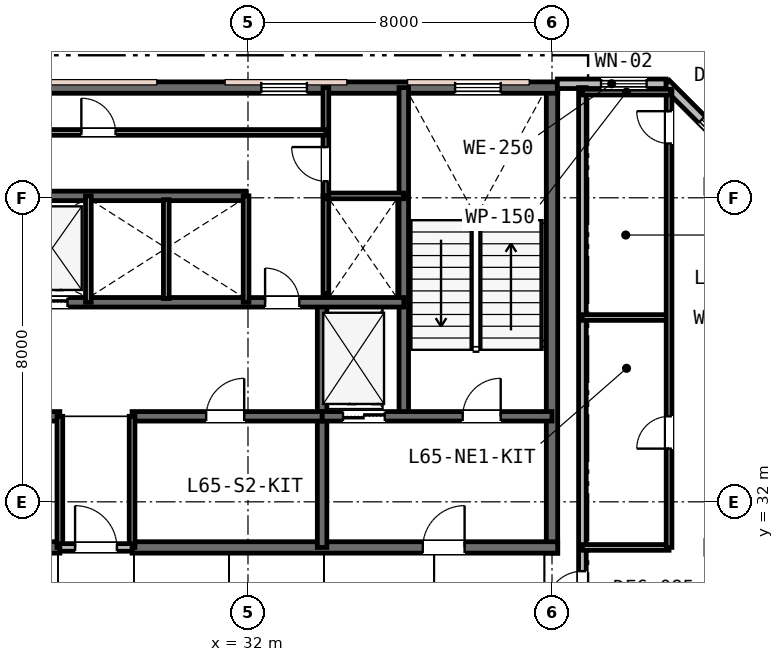
"""IFC4 building model, lengths in metres.
Left out: names, types, materials, properties, quantities, classifications, styles, units other than length and angle.
Written with IfcOpenShell. Run it as: python <this file> out.ifc"""

import sys

from ifc_helpers import new_model, si_unit, direction, frame, frame_2d, origin, place, context, subcontext, project, spatial, rectangle, extrude, element, fill, save


model = new_model("IFC4")
c1 = context("Model", 3, precision=1e-05, world=origin(), true_north=direction((0.0, 1.0)))
c2 = subcontext(c1, "Body", "Model", "MODEL_VIEW")
j1 = project(units=[si_unit("LENGTHUNIT", "METRE"), si_unit("PLANEANGLEUNIT", "RADIAN")], contexts=[c1])
p1 = place(None, origin())
s1 = spatial("IfcSite", under=j1, at=p1, CompositionType="ELEMENT")
p2 = place(p1, origin())
s2 = spatial("IfcBuilding", under=s1, at=p2, CompositionType="ELEMENT")
p3 = place(p2, frame((0.0, 0.0, 252.6)))
s3 = spatial("IfcBuildingStorey", under=s2, at=p3, CompositionType="ELEMENT", Elevation=252.6)
p4 = place(p3, frame((40.0, 30.65, 0.0), z_axis=(0.0, 0.0, 1.0), x_axis=(0.0, 1.0, 0.0)))
e1 = element("IfcWall", 1, at=p4, inside=s3, PredefinedType="SHEAR", context=c2, shape_type="SweptSolid", body=[
    extrude(rectangle(XDim=12.3, YDim=0.3, at=frame_2d((6.15, 0.0))), origin(), (0.0, 0.0, 1.0), 3.8),
])
p5 = place(p3, frame((15.85, 42.9, 0.0), z_axis=(0.0, 0.0, 1.0), x_axis=(1.0, 0.0, 0.0)))
e2 = element("IfcWall", 2, at=p5, inside=s3, PredefinedType="SHEAR", context=c2, shape_type="SweptSolid", body=[
    extrude(rectangle(XDim=24.3, YDim=0.3, at=frame_2d((12.15, 0.0))), origin(), (0.0, 0.0, 1.0), 3.8),
])
p6 = place(p5, frame((1.6, 0.0, 0.95)))
e3 = element("IfcOpeningElement", 3, at=p6, cuts=e2, PredefinedType="OPENING", context=c2, shape_type="SweptSolid", body=[
    extrude(rectangle(XDim=1.2, YDim=1.6, at=frame_2d((0.6, 0.8))), frame((0.0, 0.16, 0.0), z_axis=(0.0, -1.0, 0.0), x_axis=(1.0, 0.0, 0.0)), (0.0, 0.0, 1.0), 0.32),
])
p7 = place(p5, frame((16.5, 0.0, 0.95)))
e4 = element("IfcOpeningElement", 4, at=p7, cuts=e2, PredefinedType="OPENING", context=c2, shape_type="SweptSolid", body=[
    extrude(rectangle(XDim=1.2, YDim=1.6, at=frame_2d((0.6, 0.8))), frame((0.0, 0.16, 0.0), z_axis=(0.0, -1.0, 0.0), x_axis=(1.0, 0.0, 0.0)), (0.0, 0.0, 1.0), 0.32),
])
p8 = place(p5, frame((21.6, 0.0, 0.95)))
e5 = element("IfcOpeningElement", 5, at=p8, cuts=e2, PredefinedType="OPENING", context=c2, shape_type="SweptSolid", body=[
    extrude(rectangle(XDim=1.2, YDim=1.6, at=frame_2d((0.6, 0.8))), frame((0.0, 0.16, 0.0), z_axis=(0.0, -1.0, 0.0), x_axis=(1.0, 0.0, 0.0)), (0.0, 0.0, 1.0), 0.32),
])
p9 = place(p3, frame((15.85, 30.8, 0.0), z_axis=(0.0, 0.0, 1.0), x_axis=(1.0, 0.0, 0.0)))
e6 = element("IfcWall", 6, at=p9, inside=s3, PredefinedType="SHEAR", context=c2, shape_type="SweptSolid", body=[
    extrude(rectangle(XDim=11.2, YDim=0.3, at=frame_2d((5.6, 0.0))), origin(), (0.0, 0.0, 1.0), 3.8),
])
p10 = place(p9, frame((2.45, 0.0, 0.0)))
e7 = element("IfcOpeningElement", 7, at=p10, cuts=e6, PredefinedType="OPENING", context=c2, shape_type="SweptSolid", body=[
    extrude(rectangle(XDim=1.1, YDim=2.15, at=frame_2d((0.55, 1.075))), frame((0.0, 0.16, 0.0), z_axis=(0.0, -1.0, 0.0), x_axis=(1.0, 0.0, 0.0)), (0.0, 0.0, 1.0), 0.32),
])
p11 = place(p3, frame((28.95, 30.8, 0.0), z_axis=(0.0, 0.0, 1.0), x_axis=(1.0, 0.0, 0.0)))
e8 = element("IfcWall", 8, at=p11, inside=s3, PredefinedType="SHEAR", context=c2, shape_type="SweptSolid", body=[
    extrude(rectangle(XDim=11.2, YDim=0.3, at=frame_2d((5.6, 0.0))), origin(), (0.0, 0.0, 1.0), 3.8),
])
p12 = place(p11, frame((7.65, 0.0, 0.0)))
e9 = element("IfcOpeningElement", 9, at=p12, cuts=e8, PredefinedType="OPENING", context=c2, shape_type="SweptSolid", body=[
    extrude(rectangle(XDim=1.1, YDim=2.15, at=frame_2d((0.55, 1.075))), frame((0.0, 0.16, 0.0), z_axis=(0.0, -1.0, 0.0), x_axis=(1.0, 0.0, 0.0)), (0.0, 0.0, 1.0), 0.32),
])
p13 = place(p3, frame((36.1, 34.25, 0.0), z_axis=(0.0, 0.0, 1.0), x_axis=(0.0, 1.0, 0.0)))
e10 = element("IfcWall", 10, at=p13, inside=s3, PredefinedType="SHEAR", context=c2, shape_type="SweptSolid", body=[
    extrude(rectangle(XDim=8.65, YDim=0.25, at=frame_2d((4.325, 0.0))), origin(), (0.0, 0.0, 1.0), 3.8),
])
p14 = place(p3, frame((33.95, 30.8, 0.0), z_axis=(0.0, 0.0, 1.0), x_axis=(0.0, 1.0, 0.0)))
e11 = element("IfcWall", 11, at=p14, inside=s3, PredefinedType="SHEAR", context=c2, shape_type="SweptSolid", body=[
    extrude(rectangle(XDim=6.45, YDim=0.25, at=frame_2d((3.225, 0.0))), origin(), (0.0, 0.0, 1.0), 3.8),
])
p15 = place(p3, frame((33.95, 34.25, 0.0), z_axis=(0.0, 0.0, 1.0), x_axis=(1.0, 0.0, 0.0)))
e12 = element("IfcWall", 12, at=p15, inside=s3, PredefinedType="SHEAR", context=c2, shape_type="SweptSolid", body=[
    extrude(rectangle(XDim=6.05, YDim=0.25, at=frame_2d((3.025, 0.0))), origin(), (0.0, 0.0, 1.0), 3.8),
])
p16 = place(p15, frame((3.7, 0.0, 0.0)))
e13 = element("IfcOpeningElement", 13, at=p16, cuts=e12, PredefinedType="OPENING", context=c2, shape_type="SweptSolid", body=[
    extrude(rectangle(XDim=1.0, YDim=2.15, at=frame_2d((0.5, 1.075))), frame((0.0, 0.135, 0.0), z_axis=(0.0, -1.0, 0.0), x_axis=(1.0, 0.0, 0.0)), (0.0, 0.0, 1.0), 0.27),
])
p17 = place(p15, frame((0.55, 0.0, 0.0)))
e14 = element("IfcOpeningElement", 14, at=p17, cuts=e12, PredefinedType="OPENING", context=c2, shape_type="SweptSolid", body=[
    extrude(rectangle(XDim=1.1, YDim=2.15, at=frame_2d((0.55, 1.075))), frame((0.0, 0.135, 0.0), z_axis=(0.0, -1.0, 0.0), x_axis=(1.0, 0.0, 0.0)), (0.0, 0.0, 1.0), 0.27),
])
p18 = place(p3, frame((22.05, 34.25, 0.0), z_axis=(0.0, 0.0, 1.0), x_axis=(1.0, 0.0, 0.0)))
e15 = element("IfcWall", 15, at=p18, inside=s3, PredefinedType="SHEAR", context=c2, shape_type="SweptSolid", body=[
    extrude(rectangle(XDim=5.0, YDim=0.25, at=frame_2d((2.5, 0.0))), origin(), (0.0, 0.0, 1.0), 3.8),
])
p19 = place(p18, frame((1.95, 0.0, 0.0)))
e16 = element("IfcOpeningElement", 16, at=p19, cuts=e15, PredefinedType="OPENING", context=c2, shape_type="SweptSolid", body=[
    extrude(rectangle(XDim=1.0, YDim=2.15, at=frame_2d((0.5, 1.075))), frame((0.0, 0.135, 0.0), z_axis=(0.0, -1.0, 0.0), x_axis=(1.0, 0.0, 0.0)), (0.0, 0.0, 1.0), 0.27),
])
p20 = place(p3, frame((28.95, 34.25, 0.0), z_axis=(0.0, 0.0, 1.0), x_axis=(1.0, 0.0, 0.0)))
e17 = element("IfcWall", 17, at=p20, inside=s3, PredefinedType="SHEAR", context=c2, shape_type="SweptSolid", body=[
    extrude(rectangle(XDim=5.0, YDim=0.25, at=frame_2d((2.5, 0.0))), origin(), (0.0, 0.0, 1.0), 3.8),
])
p21 = place(p20, frame((1.95, 0.0, 0.0)))
e18 = element("IfcOpeningElement", 18, at=p21, cuts=e17, PredefinedType="OPENING", context=c2, shape_type="SweptSolid", body=[
    extrude(rectangle(XDim=1.0, YDim=2.15, at=frame_2d((0.5, 1.075))), frame((0.0, 0.135, 0.0), z_axis=(0.0, -1.0, 0.0), x_axis=(1.0, 0.0, 0.0)), (0.0, 0.0, 1.0), 0.27),
])
p22 = place(p3, frame((19.9, 37.25, 0.0), z_axis=(0.0, 0.0, 1.0), x_axis=(1.0, 0.0, 0.0)))
e19 = element("IfcWall", 19, at=p22, inside=s3, PredefinedType="SHEAR", context=c2, shape_type="SweptSolid", body=[
    extrude(rectangle(XDim=16.2, YDim=0.25, at=frame_2d((8.1, 0.0))), origin(), (0.0, 0.0, 1.0), 3.8),
])
p23 = place(p22, frame((12.55, 0.0, 0.0)))
e20 = element("IfcOpeningElement", 20, at=p23, cuts=e19, PredefinedType="OPENING", context=c2, shape_type="SweptSolid", body=[
    extrude(rectangle(XDim=0.9, YDim=2.15, at=frame_2d((0.45, 1.075))), frame((0.0, 0.135, 0.0), z_axis=(0.0, -1.0, 0.0), x_axis=(1.0, 0.0, 0.0)), (0.0, 0.0, 1.0), 0.27),
])
p24 = place(p22, frame((2.5, 0.0, 0.0)))
e21 = element("IfcOpeningElement", 21, at=p24, cuts=e19, PredefinedType="OPENING", context=c2, shape_type="SweptSolid", body=[
    extrude(rectangle(XDim=1.05, YDim=2.15, at=frame_2d((0.525, 1.075))), frame((0.0, 0.135, 0.0), z_axis=(0.0, -1.0, 0.0), x_axis=(1.0, 0.0, 0.0)), (0.0, 0.0, 1.0), 0.27),
])
p25 = place(p22, frame((4.4, 0.0, 0.0)))
e22 = element("IfcOpeningElement", 22, at=p25, cuts=e19, PredefinedType="OPENING", context=c2, shape_type="SweptSolid", body=[
    extrude(rectangle(XDim=1.05, YDim=2.15, at=frame_2d((0.525, 1.075))), frame((0.0, 0.135, 0.0), z_axis=(0.0, -1.0, 0.0), x_axis=(1.0, 0.0, 0.0)), (0.0, 0.0, 1.0), 0.27),
])
p26 = place(p22, frame((6.3, 0.0, 0.0)))
e23 = element("IfcOpeningElement", 23, at=p26, cuts=e19, PredefinedType="OPENING", context=c2, shape_type="SweptSolid", body=[
    extrude(rectangle(XDim=1.05, YDim=2.15, at=frame_2d((0.525, 1.075))), frame((0.0, 0.135, 0.0), z_axis=(0.0, -1.0, 0.0), x_axis=(1.0, 0.0, 0.0)), (0.0, 0.0, 1.0), 0.27),
])
p27 = place(p3, frame((19.9, 40.05, 0.0), z_axis=(0.0, 0.0, 1.0), x_axis=(1.0, 0.0, 0.0)))
e24 = element("IfcWall", 24, at=p27, inside=s3, PredefinedType="SHEAR", context=c2, shape_type="SweptSolid", body=[
    extrude(rectangle(XDim=12.05, YDim=0.25, at=frame_2d((6.025, 0.0))), origin(), (0.0, 0.0, 1.0), 3.8),
])
p28 = place(p3, frame((46.0, 40.0, 0.0), z_axis=(0.0, 0.0, 1.0), x_axis=(-0.707106781187, 0.707106781187, 0.0)))
e25 = element("IfcWall", 25, at=p28, inside=s3, PredefinedType="STANDARD", context=c2, shape_type="SweptSolid", body=[
    extrude(rectangle(XDim=4.243, YDim=0.25, at=frame_2d((2.121, 0.0))), origin(), (0.0, 0.0, 1.0), 3.53),
])
p29 = place(p28, frame((1.111, 0.0, 0.75)))
e26 = element("IfcOpeningElement", 26, at=p29, cuts=e25, PredefinedType="OPENING", context=c2, shape_type="SweptSolid", body=[
    extrude(rectangle(XDim=1.8, YDim=1.85, at=frame_2d((0.9, 0.925))), frame((0.0, 0.135, 0.0), z_axis=(0.0, -1.0, 0.0), x_axis=(1.0, 0.0, 0.0)), (0.0, 0.0, 1.0), 0.27),
])
p30 = place(p3, frame((43.0, 43.0, 0.0), z_axis=(0.0, 0.0, 1.0), x_axis=(-1.0, 0.0, 0.0)))
e27 = element("IfcWall", 27, at=p30, inside=s3, PredefinedType="STANDARD", context=c2, shape_type="SweptSolid", body=[
    extrude(rectangle(XDim=2.86, YDim=0.25, at=frame_2d((1.43, 0.0))), origin(), (0.0, 0.0, 1.0), 3.53),
])
p31 = place(p30, frame((0.51, 0.0, 0.85)))
e28 = element("IfcOpeningElement", 28, at=p31, cuts=e27, PredefinedType="OPENING", context=c2, shape_type="SweptSolid", body=[
    extrude(rectangle(XDim=1.2, YDim=1.6, at=frame_2d((0.6, 0.8))), frame((0.0, 0.135, 0.0), z_axis=(0.0, -1.0, 0.0), x_axis=(1.0, 0.0, 0.0)), (0.0, 0.0, 1.0), 0.27),
])
for number, where, z_axis, x_axis in (
    (29, (27.05, 30.8, 0.0), (0.0, 0.0, 1.0), (0.0, 1.0, 0.0)),
    (30, (28.95, 30.8, 0.0), (0.0, 0.0, 1.0), (0.0, 1.0, 0.0)),
):
    element("IfcWall", number, at=place(p3, frame(where, z_axis=z_axis, x_axis=x_axis)), inside=s3, PredefinedType="PLUMBINGWALL", context=c2, shape_type="SweptSolid", body=[
        extrude(rectangle(XDim=3.45, YDim=0.15, at=frame_2d((1.725, 0.0))), origin(), (0.0, 0.0, 1.0), 3.28),
    ])
p32 = place(p3, frame((27.05, 30.8, 0.0), z_axis=(0.0, 0.0, 1.0), x_axis=(1.0, 0.0, 0.0)))
e31 = element("IfcWall", 31, at=p32, inside=s3, PredefinedType="PARTITIONING", context=c2, shape_type="SweptSolid", body=[
    extrude(rectangle(XDim=1.9, YDim=0.2, at=frame_2d((0.95, 0.0))), origin(), (0.0, 0.0, 1.0), 3.28),
])
p33 = place(p32, frame((0.4, 0.0, 0.0)))
e32 = element("IfcOpeningElement", 32, at=p33, cuts=e31, PredefinedType="OPENING", context=c2, shape_type="SweptSolid", body=[
    extrude(rectangle(XDim=1.1, YDim=2.15, at=frame_2d((0.55, 1.075))), frame((0.0, 0.11, 0.0), z_axis=(0.0, -1.0, 0.0), x_axis=(1.0, 0.0, 0.0)), (0.0, 0.0, 1.0), 0.22),
])
for number, where, z_axis, x_axis in (
    (33, (27.8, 37.25, 0.0), (0.0, 0.0, 1.0), (0.0, 1.0, 0.0)),
    (34, (31.95, 37.25, 0.0), (0.0, 0.0, 1.0), (0.0, 1.0, 0.0)),
):
    element("IfcWall", number, at=place(p3, frame(where, z_axis=z_axis, x_axis=x_axis)), inside=s3, PredefinedType="PLUMBINGWALL", context=c2, shape_type="SweptSolid", body=[
        extrude(rectangle(XDim=2.8, YDim=0.15, at=frame_2d((1.4, 0.0))), origin(), (0.0, 0.0, 1.0), 3.53),
    ])
p34 = place(p3, frame((29.85, 37.35, 0.0), z_axis=(0.0, 0.0, 1.0), x_axis=(0.0, 1.0, 0.0)))
e35 = element("IfcWall", 35, at=p34, inside=s3, PredefinedType="PLUMBINGWALL", context=c2, shape_type="SweptSolid", body=[
    extrude(rectangle(XDim=2.6, YDim=0.15, at=frame_2d((1.3, 0.0))), origin(), (0.0, 0.0, 1.0), 3.53),
])
p35 = place(p3, frame((34.05, 37.473, 0.0), z_axis=(0.0, 0.0, 1.0), x_axis=(0.0, 1.0, 0.0)))
e36 = element("IfcWall", 36, at=p35, inside=s3, PredefinedType="PLUMBINGWALL", context=c2, shape_type="SweptSolid", body=[
    extrude(rectangle(XDim=2.577, YDim=0.15, at=frame_2d((1.288, 0.0))), origin(), (0.0, 0.0, 1.0), 3.53),
])
p36 = place(p3, frame((34.05, 40.05, 0.0), z_axis=(0.0, 0.0, 1.0), x_axis=(1.0, 0.0, 0.0)))
e37 = element("IfcWall", 37, at=p36, inside=s3, PredefinedType="PARTITIONING", context=c2, shape_type="SweptSolid", body=[
    extrude(rectangle(XDim=2.05, YDim=0.15, at=frame_2d((1.025, 0.0))), origin(), (0.0, 0.0, 1.0), 3.53),
])
p37 = place(p3, frame((34.05, 40.05, 0.0), z_axis=(0.0, 0.0, 1.0), x_axis=(0.0, 1.0, 0.0)))
e38 = element("IfcWall", 38, at=p37, inside=s3, PredefinedType="PARTITIONING", context=c2, shape_type="SweptSolid", body=[
    extrude(rectangle(XDim=2.85, YDim=0.15, at=frame_2d((1.425, 0.0))), origin(), (0.0, 0.0, 1.0), 3.53),
])
p38 = place(p37, frame((0.385, 0.0, 0.0)))
e39 = element("IfcOpeningElement", 39, at=p38, cuts=e38, PredefinedType="OPENING", context=c2, shape_type="SweptSolid", body=[
    extrude(rectangle(XDim=0.9, YDim=2.15, at=frame_2d((0.45, 1.075))), frame((0.0, 0.085, 0.0), z_axis=(0.0, -1.0, 0.0), x_axis=(1.0, 0.0, 0.0)), (0.0, 0.0, 1.0), 0.17),
])
p39 = place(p3, frame((22.08, 41.72, 0.0), z_axis=(0.0, 0.0, 1.0), x_axis=(1.0, 0.0, 0.0)))
e40 = element("IfcWall", 40, at=p39, inside=s3, PredefinedType="PARTITIONING", context=c2, shape_type="SweptSolid", body=[
    extrude(rectangle(XDim=11.97, YDim=0.15, at=frame_2d((5.985, 0.0))), origin(), (0.0, 0.0, 1.0), 3.53),
])
p40 = place(p39, frame((5.535, 0.0, 0.0)))
e41 = element("IfcOpeningElement", 41, at=p40, cuts=e40, PredefinedType="OPENING", context=c2, shape_type="SweptSolid", body=[
    extrude(rectangle(XDim=0.9, YDim=2.15, at=frame_2d((0.45, 1.075))), frame((0.0, 0.085, 0.0), z_axis=(0.0, -1.0, 0.0), x_axis=(1.0, 0.0, 0.0)), (0.0, 0.0, 1.0), 0.17),
])
p41 = place(p3, frame((40.8, 28.6, 0.0), z_axis=(0.0, 0.0, 1.0), x_axis=(0.0, 1.0, 0.0)))
e42 = element("IfcWall", 42, at=p41, inside=s3, PredefinedType="PARTITIONING", context=c2, shape_type="SweptSolid", body=[
    extrude(rectangle(XDim=14.3, YDim=0.2, at=frame_2d((7.15, 0.0))), origin(), (0.0, 0.0, 1.0), 3.16),
])
p42 = place(p41, frame((0.625, 0.0, 0.0)))
e43 = element("IfcOpeningElement", 43, at=p42, cuts=e42, PredefinedType="OPENING", context=c2, shape_type="SweptSolid", body=[
    extrude(rectangle(XDim=0.95, YDim=2.15, at=frame_2d((0.475, 1.075))), frame((0.0, 0.11, 0.0), z_axis=(0.0, -1.0, 0.0), x_axis=(1.0, 0.0, 0.0)), (0.0, 0.0, 1.0), 0.22),
])
p43 = place(p3, frame((40.8, 30.8, 0.0), z_axis=(0.0, 0.0, 1.0), x_axis=(1.0, 0.0, 0.0)))
e44 = element("IfcWall", 44, at=p43, inside=s3, PredefinedType="PARTITIONING", context=c2, shape_type="SweptSolid", body=[
    extrude(rectangle(XDim=2.28, YDim=0.15, at=frame_2d((1.14, 0.0))), origin(), (0.0, 0.0, 1.0), 3.16),
])
p44 = place(p3, frame((40.8, 36.85, 0.0), z_axis=(0.0, 0.0, 1.0), x_axis=(1.0, 0.0, 0.0)))
e45 = element("IfcWall", 45, at=p44, inside=s3, PredefinedType="PARTITIONING", context=c2, shape_type="SweptSolid", body=[
    extrude(rectangle(XDim=2.28, YDim=0.15, at=frame_2d((1.14, 0.0))), origin(), (0.0, 0.0, 1.0), 3.53),
])
p45 = place(p3, frame((43.08, 30.8, 0.0), z_axis=(0.0, 0.0, 1.0), x_axis=(0.0, 1.0, 0.0)))
e46 = element("IfcWall", 46, at=p45, inside=s3, PredefinedType="PARTITIONING", context=c2, shape_type="SweptSolid", body=[
    extrude(rectangle(XDim=12.02, YDim=0.15, at=frame_2d((6.01, 0.0))), origin(), (0.0, 0.0, 1.0), 3.16),
])
p46 = place(p45, frame((2.6, 0.0, 0.0)))
e47 = element("IfcOpeningElement", 47, at=p46, cuts=e46, PredefinedType="OPENING", context=c2, shape_type="SweptSolid", body=[
    extrude(rectangle(XDim=0.85, YDim=2.15, at=frame_2d((0.425, 1.075))), frame((0.0, 0.085, 0.0), z_axis=(0.0, -1.0, 0.0), x_axis=(1.0, 0.0, 0.0)), (0.0, 0.0, 1.0), 0.17),
])
p47 = place(p45, frame((10.629, 0.0, 0.0)))
e48 = element("IfcOpeningElement", 48, at=p47, cuts=e46, PredefinedType="OPENING", context=c2, shape_type="SweptSolid", body=[
    extrude(rectangle(XDim=0.85, YDim=2.15, at=frame_2d((0.425, 1.075))), frame((0.0, 0.085, 0.0), z_axis=(0.0, -1.0, 0.0), x_axis=(1.0, 0.0, 0.0)), (0.0, 0.0, 1.0), 0.17),
])
p48 = place(p3, frame((40.8, 42.78, 0.0), z_axis=(0.0, 0.0, 1.0), x_axis=(1.0, 0.0, 0.0)))
e49 = element("IfcWall", 49, at=p48, inside=s3, PredefinedType="PARTITIONING", context=c2, shape_type="SweptSolid", body=[
    extrude(rectangle(XDim=2.32, YDim=0.15, at=frame_2d((1.16, 0.0))), origin(), (0.0, 0.0, 1.0), 3.53),
])
p49 = place(p7, origin())
e50 = element("IfcWindow", 50, at=p49, inside=s3, PartitioningType="SINGLE_PANEL", PredefinedType="WINDOW", context=c2, shape_type="SweptSolid", body=[
    extrude(rectangle(XDim=1.2, YDim=1.6, at=frame_2d((0.6, 0.8))), frame((0.0, 0.03, 0.0), z_axis=(0.0, -1.0, 0.0), x_axis=(1.0, 0.0, 0.0)), (0.0, 0.0, 1.0), 0.06),
])
fill(e4, e50)
p50 = place(p8, origin())
e51 = element("IfcWindow", 51, at=p50, inside=s3, PartitioningType="SINGLE_PANEL", PredefinedType="WINDOW", context=c2, shape_type="SweptSolid", body=[
    extrude(rectangle(XDim=1.2, YDim=1.6, at=frame_2d((0.6, 0.8))), frame((0.0, 0.03, 0.0), z_axis=(0.0, -1.0, 0.0), x_axis=(1.0, 0.0, 0.0)), (0.0, 0.0, 1.0), 0.06),
])
fill(e5, e51)
p51 = place(p29, origin())
e52 = element("IfcWindow", 52, at=p51, inside=s3, PartitioningType="SINGLE_PANEL", PredefinedType="WINDOW", context=c2, shape_type="SweptSolid", body=[
    extrude(rectangle(XDim=1.8, YDim=1.85, at=frame_2d((0.9, 0.925))), frame((0.0, 0.03, 0.0), z_axis=(0.0, -1.0, 0.0), x_axis=(1.0, 0.0, 0.0)), (0.0, 0.0, 1.0), 0.06),
])
fill(e26, e52)
p52 = place(p31, origin())
e53 = element("IfcWindow", 53, at=p52, inside=s3, PartitioningType="SINGLE_PANEL", PredefinedType="WINDOW", context=c2, shape_type="SweptSolid", body=[
    extrude(rectangle(XDim=1.2, YDim=1.6, at=frame_2d((0.6, 0.8))), frame((0.0, 0.03, 0.0), z_axis=(0.0, -1.0, 0.0), x_axis=(1.0, 0.0, 0.0)), (0.0, 0.0, 1.0), 0.06),
])
fill(e28, e53)
p53 = place(p33, origin())
e54 = element("IfcDoor", 54, at=p53, inside=s3, OperationType="SINGLE_SWING_LEFT", PredefinedType="DOOR", context=c2, shape_type="SweptSolid", body=[
    extrude(rectangle(XDim=1.1, YDim=2.15, at=frame_2d((0.55, 1.075))), frame((0.0, 0.025, 0.0), z_axis=(0.0, -1.0, 0.0), x_axis=(1.0, 0.0, 0.0)), (0.0, 0.0, 1.0), 0.05),
])
fill(e32, e54)
p54 = place(p16, origin())
e55 = element("IfcDoor", 55, at=p54, inside=s3, OperationType="SINGLE_SWING_RIGHT", PredefinedType="DOOR", context=c2, shape_type="SweptSolid", body=[
    extrude(rectangle(XDim=1.0, YDim=2.15, at=frame_2d((0.5, 1.075))), frame((0.0, 0.025, 0.0), z_axis=(0.0, -1.0, 0.0), x_axis=(1.0, 0.0, 0.0)), (0.0, 0.0, 1.0), 0.05),
])
fill(e13, e55)
p55 = place(p12, origin())
e56 = element("IfcDoor", 56, at=p55, inside=s3, OperationType="SINGLE_SWING_RIGHT", PredefinedType="DOOR", context=c2, shape_type="SweptSolid", body=[
    extrude(rectangle(XDim=1.1, YDim=2.15, at=frame_2d((0.55, 1.075))), frame((0.0, 0.025, 0.0), z_axis=(0.0, -1.0, 0.0), x_axis=(1.0, 0.0, 0.0)), (0.0, 0.0, 1.0), 0.05),
])
fill(e9, e56)
p56 = place(p21, origin())
e57 = element("IfcDoor", 57, at=p56, inside=s3, OperationType="SINGLE_SWING_RIGHT", PredefinedType="DOOR", context=c2, shape_type="SweptSolid", body=[
    extrude(rectangle(XDim=1.0, YDim=2.15, at=frame_2d((0.5, 1.075))), frame((0.0, 0.025, 0.0), z_axis=(0.0, -1.0, 0.0), x_axis=(1.0, 0.0, 0.0)), (0.0, 0.0, 1.0), 0.05),
])
fill(e18, e57)
p57 = place(p23, origin())
e58 = element("IfcDoor", 58, at=p57, inside=s3, OperationType="SINGLE_SWING_LEFT", PredefinedType="DOOR", context=c2, shape_type="SweptSolid", body=[
    extrude(rectangle(XDim=0.9, YDim=2.15, at=frame_2d((0.45, 1.075))), frame((0.0, 0.025, 0.0), z_axis=(0.0, -1.0, 0.0), x_axis=(1.0, 0.0, 0.0)), (0.0, 0.0, 1.0), 0.05),
])
fill(e20, e58)
p58 = place(p38, origin())
e59 = element("IfcDoor", 59, at=p58, inside=s3, OperationType="SINGLE_SWING_RIGHT", PredefinedType="DOOR", context=c2, shape_type="SweptSolid", body=[
    extrude(rectangle(XDim=0.9, YDim=2.15, at=frame_2d((0.45, 1.075))), frame((0.0, 0.025, 0.0), z_axis=(0.0, -1.0, 0.0), x_axis=(1.0, 0.0, 0.0)), (0.0, 0.0, 1.0), 0.05),
])
fill(e39, e59)
p59 = place(p40, origin())
e60 = element("IfcDoor", 60, at=p59, inside=s3, OperationType="SINGLE_SWING_LEFT", PredefinedType="DOOR", context=c2, shape_type="SweptSolid", body=[
    extrude(rectangle(XDim=0.9, YDim=2.15, at=frame_2d((0.45, 1.075))), frame((0.0, 0.025, 0.0), z_axis=(0.0, -1.0, 0.0), x_axis=(1.0, 0.0, 0.0)), (0.0, 0.0, 1.0), 0.05),
])
fill(e41, e60)
p60 = place(p42, origin())
e61 = element("IfcDoor", 61, at=p60, inside=s3, OperationType="SINGLE_SWING_LEFT", PredefinedType="DOOR", context=c2, shape_type="SweptSolid", body=[
    extrude(rectangle(XDim=0.95, YDim=2.15, at=frame_2d((0.475, 1.075))), frame((0.0, 0.025, 0.0), z_axis=(0.0, -1.0, 0.0), x_axis=(1.0, 0.0, 0.0)), (0.0, 0.0, 1.0), 0.05),
])
fill(e43, e61)
p61 = place(p46, origin())
e62 = element("IfcDoor", 62, at=p61, inside=s3, OperationType="SINGLE_SWING_LEFT", PredefinedType="DOOR", context=c2, shape_type="SweptSolid", body=[
    extrude(rectangle(XDim=0.85, YDim=2.15, at=frame_2d((0.425, 1.075))), frame((0.0, 0.025, 0.0), z_axis=(0.0, -1.0, 0.0), x_axis=(1.0, 0.0, 0.0)), (0.0, 0.0, 1.0), 0.05),
])
fill(e47, e62)
p62 = place(p47, origin())
e63 = element("IfcDoor", 63, at=p62, inside=s3, OperationType="SINGLE_SWING_RIGHT", PredefinedType="DOOR", context=c2, shape_type="SweptSolid", body=[
    extrude(rectangle(XDim=0.85, YDim=2.15, at=frame_2d((0.425, 1.075))), frame((0.0, 0.025, 0.0), z_axis=(0.0, -1.0, 0.0), x_axis=(1.0, 0.0, 0.0)), (0.0, 0.0, 1.0), 0.05),
])
fill(e48, e63)
p63 = place(p17, origin())
e64 = element("IfcDoor", 64, at=p63, inside=s3, OperationType="DOUBLE_DOOR_SLIDING", PredefinedType="DOOR", context=c2, shape_type="SweptSolid", body=[
    extrude(rectangle(XDim=1.1, YDim=2.15, at=frame_2d((0.55, 1.075))), frame((0.0, 0.025, 0.0), z_axis=(0.0, -1.0, 0.0), x_axis=(1.0, 0.0, 0.0)), (0.0, 0.0, 1.0), 0.05),
])
fill(e14, e64)
p64 = place(p26, origin())
e65 = element("IfcDoor", 65, at=p64, inside=s3, OperationType="DOUBLE_DOOR_SLIDING", PredefinedType="DOOR", context=c2, shape_type="SweptSolid", body=[
    extrude(rectangle(XDim=1.05, YDim=2.15, at=frame_2d((0.525, 1.075))), frame((0.0, 0.025, 0.0), z_axis=(0.0, -1.0, 0.0), x_axis=(1.0, 0.0, 0.0)), (0.0, 0.0, 1.0), 0.05),
])
fill(e23, e65)
save(model, sys.argv[1])
